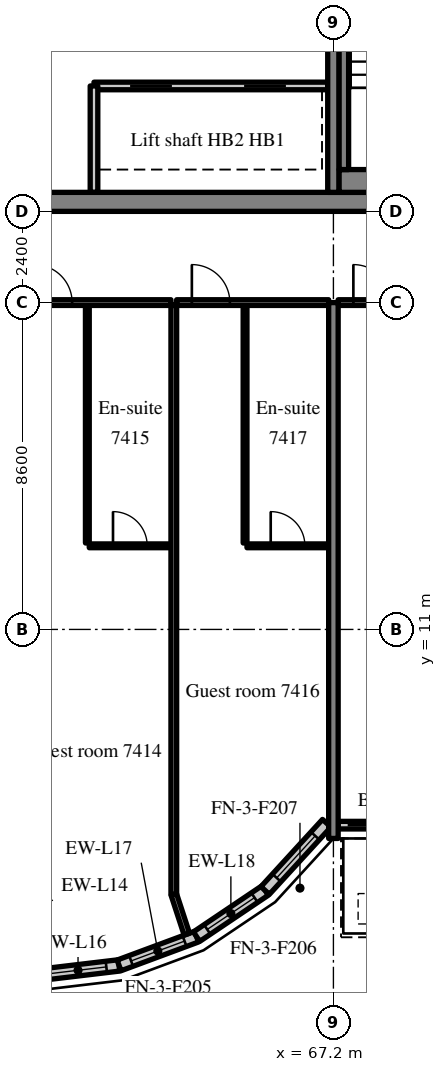
"""IFC4 building model, lengths in metres.
Left out: names, types, materials, properties, quantities, classifications, styles, units other than length and angle.
Written with IfcOpenShell. Run it as: python <this file> out.ifc"""

import sys

from ifc_helpers import new_model, si_unit, direction, frame, frame_2d, origin, place, context, subcontext, project, spatial, rectangle, extrude, source, transform, mapped, element, fill, save


model = new_model("IFC4")
c1 = context("Model", 3, precision=1e-05, world=origin(), true_north=direction((0.0, 1.0)))
c2 = subcontext(c1, "Body", "Model", "MODEL_VIEW")
j1 = project(units=[si_unit("LENGTHUNIT", "METRE"), si_unit("PLANEANGLEUNIT", "RADIAN")], contexts=[c1])
p1 = place(None, origin())
s1 = spatial("IfcSite", under=j1, at=p1, CompositionType="ELEMENT")
p2 = place(p1, origin())
s2 = spatial("IfcBuilding", under=s1, at=p2, CompositionType="ELEMENT")
p3 = place(p2, frame((0.0, 0.0, 309.7)))
s3 = spatial("IfcBuildingStorey", under=s2, at=p3, CompositionType="ELEMENT", Elevation=309.7)
m1 = source(origin(), c2, "Body", "SweptSolid", [
    extrude(rectangle(XDim=50.4, YDim=0.5, at=frame_2d((25.2, 0.0))), origin(), (0.0, 0.0, 1.0), 3.72),
])
p4 = place(p3, frame((25.2, 22.25, 0.0), z_axis=(0.0, 0.0, 1.0), x_axis=(1.0, 0.0, 0.0)))
e1 = element("IfcWall", 1, at=p4, inside=s3, PredefinedType="SHEAR", context=c2, shape_type="MappedRepresentation", body=[
    mapped(m1, transform((0.0, 0.0, 0.0), scale=1.0)),
])
m2 = source(origin(), c2, "Body", "SweptSolid", [
    extrude(rectangle(XDim=1.8, YDim=2.1, at=frame_2d((0.9, 1.05))), frame((0.0, 0.26, 0.0), z_axis=(0.0, -1.0, 0.0), x_axis=(1.0, 0.0, 0.0)), (0.0, 0.0, 1.0), 0.52),
])
p5 = place(p4, frame((15.9, 0.0, 0.0)))
e2 = element("IfcOpeningElement", 2, at=p5, cuts=e1, PredefinedType="OPENING", context=c2, shape_type="MappedRepresentation", body=[
    mapped(m2, transform((0.0, 0.0, 0.0), scale=1.0)),
])
m3 = source(origin(), c2, "Body", "SweptSolid", [
    extrude(rectangle(XDim=0.9, YDim=2.1, at=frame_2d((0.45, 1.05))), frame((0.0, 0.26, 0.0), z_axis=(0.0, -1.0, 0.0), x_axis=(1.0, 0.0, 0.0)), (0.0, 0.0, 1.0), 0.52),
])
p6 = place(p4, frame((11.175, 0.0, 0.0)))
e3 = element("IfcOpeningElement", 3, at=p6, cuts=e1, PredefinedType="OPENING", context=c2, shape_type="MappedRepresentation", body=[
    mapped(m3, transform((0.0, 0.0, 0.0), scale=1.0)),
])
p7 = place(p4, frame((21.525, 0.0, 0.0)))
e4 = element("IfcOpeningElement", 4, at=p7, cuts=e1, PredefinedType="OPENING", context=c2, shape_type="MappedRepresentation", body=[
    mapped(m3, transform((0.0, 0.0, 0.0), scale=1.0)),
])
p8 = place(p4, frame((32.7, 0.0, 0.0)))
e5 = element("IfcOpeningElement", 5, at=p8, cuts=e1, PredefinedType="OPENING", context=c2, shape_type="MappedRepresentation", body=[
    mapped(m2, transform((0.0, 0.0, 0.0), scale=1.0)),
])
m4 = source(origin(), c2, "Body", "SweptSolid", [
    extrude(rectangle(XDim=1.2, YDim=2.1, at=frame_2d((0.6, 1.05))), frame((0.0, 0.26, 0.0), z_axis=(0.0, -1.0, 0.0), x_axis=(1.0, 0.0, 0.0)), (0.0, 0.0, 1.0), 0.52),
])
p9 = place(p4, frame((6.5, 0.0, 0.0)))
e6 = element("IfcOpeningElement", 6, at=p9, cuts=e1, PredefinedType="OPENING", context=c2, shape_type="MappedRepresentation", body=[
    mapped(m4, transform((0.0, 0.0, 0.0), scale=1.0)),
])
p10 = place(p4, frame((47.975, 0.0, 0.0)))
e7 = element("IfcOpeningElement", 7, at=p10, cuts=e1, PredefinedType="OPENING", context=c2, shape_type="MappedRepresentation", body=[
    mapped(m4, transform((0.0, 0.0, 0.0), scale=1.0)),
])
m5 = source(origin(), c2, "Body", "SweptSolid", [
    extrude(rectangle(XDim=19.0, YDim=0.3, at=frame_2d((9.5, 0.0))), origin(), (0.0, 0.0, 1.0), 3.72),
])
p11 = place(p3, frame((67.2, 22.5, 0.0), z_axis=(0.0, 0.0, 1.0), x_axis=(0.0, 1.0, 0.0)))
e8 = element("IfcWall", 8, at=p11, inside=s3, PredefinedType="SHEAR", context=c2, shape_type="MappedRepresentation", body=[
    mapped(m5, transform((0.0, 0.0, 0.0), scale=1.0)),
])
m6 = source(origin(), c2, "Body", "SweptSolid", [
    extrude(rectangle(XDim=14.1, YDim=0.25, at=frame_2d((7.05, 0.0))), origin(), (0.0, 0.0, 1.0), 3.72),
])
p12 = place(p3, frame((67.2, 5.5, 0.0), z_axis=(0.0, 0.0, 1.0), x_axis=(0.0, 1.0, 0.0)))
e9 = element("IfcWall", 9, at=p12, inside=s3, PredefinedType="SHEAR", context=c2, shape_type="MappedRepresentation", body=[
    mapped(m6, transform((0.0, 0.0, 0.0), scale=1.0)),
])
m7 = source(origin(), c2, "Body", "SweptSolid", [
    extrude(rectangle(XDim=2.175, YDim=0.3, at=frame_2d((1.087, 0.0))), origin(), (0.0, 0.0, 1.0), 3.72),
])
p13 = place(p3, frame((59.4, 1.903, 0.0), z_axis=(0.0, 0.0, 1.0), x_axis=(0.993002698611, 0.118091661648, 0.0)))
e10 = element("IfcWall", 10, at=p13, inside=s3, PredefinedType="SOLIDWALL", context=c2, shape_type="MappedRepresentation", body=[
    mapped(m7, transform((0.0, 0.0, 0.0), scale=1.0)),
])
m8 = source(origin(), c2, "Body", "SweptSolid", [
    extrude(rectangle(XDim=1.5, YDim=2.0, at=frame_2d((0.75, 1.0))), frame((0.0, 0.16, 0.0), z_axis=(0.0, -1.0, 0.0), x_axis=(1.0, 0.0, 0.0)), (0.0, 0.0, 1.0), 0.32),
])
p14 = place(p13, frame((0.337, 0.0, 0.9)))
e11 = element("IfcOpeningElement", 11, at=p14, cuts=e10, PredefinedType="OPENING", context=c2, shape_type="MappedRepresentation", body=[
    mapped(m8, transform((0.0, 0.0, 0.0), scale=1.0)),
])
m9 = source(origin(), c2, "Body", "SweptSolid", [
    extrude(rectangle(XDim=2.176, YDim=0.3, at=frame_2d((1.088, 0.0))), origin(), (0.0, 0.0, 1.0), 3.72),
])
p15 = place(p3, frame((61.56, 2.16, 0.0), z_axis=(0.0, 0.0, 1.0), x_axis=(0.937531979054, 0.347899106424, 0.0)))
e12 = element("IfcWall", 12, at=p15, inside=s3, PredefinedType="SOLIDWALL", context=c2, shape_type="MappedRepresentation", body=[
    mapped(m9, transform((0.0, 0.0, 0.0), scale=1.0)),
])
p16 = place(p15, frame((0.338, 0.0, 0.9)))
e13 = element("IfcOpeningElement", 13, at=p16, cuts=e12, PredefinedType="OPENING", context=c2, shape_type="MappedRepresentation", body=[
    mapped(m8, transform((0.0, 0.0, 0.0), scale=1.0)),
])
m10 = source(origin(), c2, "Body", "SweptSolid", [
    extrude(rectangle(XDim=2.176, YDim=0.3, at=frame_2d((1.088, 0.0))), origin(), (0.0, 0.0, 1.0), 3.72),
])
p17 = place(p3, frame((63.599, 2.917, 0.0), z_axis=(0.0, 0.0, 1.0), x_axis=(0.829625727223, 0.558319937607, 0.0)))
e14 = element("IfcWall", 14, at=p17, inside=s3, PredefinedType="SOLIDWALL", context=c2, shape_type="MappedRepresentation", body=[
    mapped(m10, transform((0.0, 0.0, 0.0), scale=1.0)),
])
p18 = place(p17, frame((0.338, 0.0, 0.9)))
e15 = element("IfcOpeningElement", 15, at=p18, cuts=e14, PredefinedType="OPENING", context=c2, shape_type="MappedRepresentation", body=[
    mapped(m8, transform((0.0, 0.0, 0.0), scale=1.0)),
])
m11 = source(origin(), c2, "Body", "SweptSolid", [
    extrude(rectangle(XDim=2.398, YDim=0.3, at=frame_2d((1.199, 0.0))), origin(), (0.0, 0.0, 1.0), 3.72),
])
p19 = place(p3, frame((65.404, 4.131, 0.0), z_axis=(0.0, 0.0, 1.0), x_axis=(0.675374189419, 0.737475222815, 0.0)))
e16 = element("IfcWall", 16, at=p19, inside=s3, PredefinedType="SOLIDWALL", context=c2, shape_type="MappedRepresentation", body=[
    mapped(m11, transform((0.0, 0.0, 0.0), scale=1.0)),
])
p20 = place(p19, frame((0.449, 0.0, 0.9)))
e17 = element("IfcOpeningElement", 17, at=p20, cuts=e16, PredefinedType="OPENING", context=c2, shape_type="MappedRepresentation", body=[
    mapped(m8, transform((0.0, 0.0, 0.0), scale=1.0)),
])
m12 = source(origin(), c2, "Body", "SweptSolid", [
    extrude(rectangle(XDim=8.15, YDim=0.2, at=frame_2d((4.075, 0.0))), origin(), (0.0, 0.0, 1.0), 3.17),
])
p21 = place(p3, frame((67.325, 5.85, 0.0), z_axis=(0.0, 0.0, 1.0), x_axis=(1.0, 0.0, 0.0)))
e18 = element("IfcWall", 18, at=p21, inside=s3, PredefinedType="SOLIDWALL", context=c2, shape_type="MappedRepresentation", body=[
    mapped(m12, transform((0.0, 0.0, 0.0), scale=1.0)),
])
m13 = source(origin(), c2, "Body", "SweptSolid", [
    extrude(rectangle(XDim=1.2, YDim=2.4, at=frame_2d((0.6, 1.2))), frame((0.0, 0.11, 0.0), z_axis=(0.0, -1.0, 0.0), x_axis=(1.0, 0.0, 0.0)), (0.0, 0.0, 1.0), 0.22),
])
p22 = place(p21, frame((0.25, 0.0, 0.0)))
e19 = element("IfcOpeningElement", 19, at=p22, cuts=e18, PredefinedType="OPENING", context=c2, shape_type="MappedRepresentation", body=[
    mapped(m13, transform((0.0, 0.0, 0.0), scale=1.0)),
])
m14 = source(origin(), c2, "Body", "SweptSolid", [
    extrude(rectangle(XDim=1.5, YDim=1.5, at=frame_2d((0.75, 0.75))), frame((0.0, 0.11, 0.0), z_axis=(0.0, -1.0, 0.0), x_axis=(1.0, 0.0, 0.0)), (0.0, 0.0, 1.0), 0.22),
])
p23 = place(p21, frame((2.325, 0.0, 0.9)))
e20 = element("IfcOpeningElement", 20, at=p23, cuts=e18, PredefinedType="OPENING", context=c2, shape_type="MappedRepresentation", body=[
    mapped(m14, transform((0.0, 0.0, 0.0), scale=1.0)),
])
p24 = place(p21, frame((4.325, 0.0, 0.0)))
e21 = element("IfcOpeningElement", 21, at=p24, cuts=e18, PredefinedType="OPENING", context=c2, shape_type="MappedRepresentation", body=[
    mapped(m13, transform((0.0, 0.0, 0.0), scale=1.0)),
])
p25 = place(p21, frame((6.4, 0.0, 0.9)))
e22 = element("IfcOpeningElement", 22, at=p25, cuts=e18, PredefinedType="OPENING", context=c2, shape_type="MappedRepresentation", body=[
    mapped(m14, transform((0.0, 0.0, 0.0), scale=1.0)),
])
m15 = source(origin(), c2, "Body", "SweptSolid", [
    extrude(rectangle(XDim=6.15, YDim=0.2, at=frame_2d((3.075, 0.0))), origin(), (0.0, 0.0, 1.0), 3.72),
])
p26 = place(p3, frame((67.05, 25.3, 0.0), z_axis=(0.0, 0.0, 1.0), x_axis=(-1.0, 0.0, 0.0)))
e23 = element("IfcWall", 23, at=p26, inside=s3, PredefinedType="SOLIDWALL", context=c2, shape_type="MappedRepresentation", body=[
    mapped(m15, transform((0.0, 0.0, 0.0), scale=1.0)),
])
m16 = source(origin(), c2, "Body", "SweptSolid", [
    extrude(rectangle(XDim=1.1, YDim=2.1, at=frame_2d((0.55, 1.05))), frame((0.0, 0.11, 0.0), z_axis=(0.0, -1.0, 0.0), x_axis=(1.0, 0.0, 0.0)), (0.0, 0.0, 1.0), 0.22),
])
p27 = place(p26, frame((1.1, 0.0, 0.0)))
e24 = element("IfcOpeningElement", 24, at=p27, cuts=e23, PredefinedType="OPENING", context=c2, shape_type="MappedRepresentation", body=[
    mapped(m16, transform((0.0, 0.0, 0.0), scale=1.0)),
])
p28 = place(p26, frame((4.1, 0.0, 0.0)))
e25 = element("IfcOpeningElement", 25, at=p28, cuts=e23, PredefinedType="OPENING", context=c2, shape_type="MappedRepresentation", body=[
    mapped(m16, transform((0.0, 0.0, 0.0), scale=1.0)),
])
m17 = source(origin(), c2, "Body", "SweptSolid", [
    extrude(rectangle(XDim=2.8, YDim=0.2, at=frame_2d((1.4, 0.0))), origin(), (0.0, 0.0, 1.0), 3.72),
])
p29 = place(p3, frame((60.9, 22.5, 0.0), z_axis=(0.0, 0.0, 1.0), x_axis=(0.0, 1.0, 0.0)))
e26 = element("IfcWall", 26, at=p29, inside=s3, PredefinedType="SOLIDWALL", context=c2, shape_type="MappedRepresentation", body=[
    mapped(m17, transform((0.0, 0.0, 0.0), scale=1.0)),
])
m18 = source(origin(), c2, "Body", "SweptSolid", [
    extrude(rectangle(XDim=4.9, YDim=0.6, at=frame_2d((2.45, 0.0))), origin(), (0.0, 0.0, 1.0), 3.72),
])
p30 = place(p3, frame((67.35, 22.8, 0.0), z_axis=(0.0, 0.0, 1.0), x_axis=(1.0, 0.0, 0.0)))
e27 = element("IfcWall", 27, at=p30, inside=s3, PredefinedType="SOLIDWALL", context=c2, shape_type="MappedRepresentation", body=[
    mapped(m18, transform((0.0, 0.0, 0.0), scale=1.0)),
])
m19 = source(origin(), c2, "Body", "SweptSolid", [
    extrude(rectangle(XDim=8.1, YDim=0.25, at=frame_2d((4.05, 0.0))), origin(), (0.0, 0.0, 1.0), 3.72),
])
p31 = place(p3, frame((67.475, 23.1, 0.0), z_axis=(0.0, 0.0, 1.0), x_axis=(0.0, 1.0, 0.0)))
e28 = element("IfcWall", 28, at=p31, inside=s3, PredefinedType="SOLIDWALL", context=c2, shape_type="MappedRepresentation", body=[
    mapped(m19, transform((0.0, 0.0, 0.0), scale=1.0)),
])
m20 = source(origin(), c2, "Body", "SweptSolid", [
    extrude(rectangle(XDim=6.25, YDim=0.1, at=frame_2d((3.125, 0.0))), origin(), (0.0, 0.0, 1.0), 3.72),
])
p32 = place(p3, frame((60.725, 13.275, 0.0), z_axis=(0.0, 0.0, 1.0), x_axis=(0.0, 1.0, 0.0)))
e29 = element("IfcWall", 29, at=p32, inside=s3, PredefinedType="PARTITIONING", context=c2, shape_type="MappedRepresentation", body=[
    mapped(m20, transform((0.0, 0.0, 0.0), scale=1.0)),
])
m21 = source(origin(), c2, "Body", "SweptSolid", [
    extrude(rectangle(XDim=2.15, YDim=0.1, at=frame_2d((1.075, 0.0))), origin(), (0.0, 0.0, 1.0), 3.72),
])
p33 = place(p3, frame((60.775, 13.2, 0.0), z_axis=(0.0, 0.0, 1.0), x_axis=(1.0, 0.0, 0.0)))
e30 = element("IfcWall", 30, at=p33, inside=s3, PredefinedType="PARTITIONING", context=c2, shape_type="MappedRepresentation", body=[
    mapped(m21, transform((0.0, 0.0, 0.0), scale=1.0)),
])
m22 = source(origin(), c2, "Body", "SweptSolid", [
    extrude(rectangle(XDim=0.9, YDim=2.1, at=frame_2d((0.45, 1.05))), frame((0.0, 0.06, 0.0), z_axis=(0.0, -1.0, 0.0), x_axis=(1.0, 0.0, 0.0)), (0.0, 0.0, 1.0), 0.12),
])
p34 = place(p33, frame((0.625, 0.0, 0.0)))
e31 = element("IfcOpeningElement", 31, at=p34, cuts=e30, PredefinedType="OPENING", context=c2, shape_type="MappedRepresentation", body=[
    mapped(m22, transform((0.0, 0.0, 0.0), scale=1.0)),
])
m23 = source(origin(), c2, "Body", "SweptSolid", [
    extrude(rectangle(XDim=4.0, YDim=0.15, at=frame_2d((2.0, 0.0))), origin(), (0.0, 0.0, 1.0), 3.02),
])
p35 = place(p3, frame((58.925, 19.6, 0.0), z_axis=(0.0, 0.0, 1.0), x_axis=(1.0, 0.0, 0.0)))
e32 = element("IfcWall", 32, at=p35, inside=s3, PredefinedType="PARTITIONING", context=c2, shape_type="MappedRepresentation", body=[
    mapped(m23, transform((0.0, 0.0, 0.0), scale=1.0)),
])
m24 = source(origin(), c2, "Body", "SweptSolid", [
    extrude(rectangle(XDim=1.0, YDim=2.1, at=frame_2d((0.5, 1.05))), frame((0.0, 0.085, 0.0), z_axis=(0.0, -1.0, 0.0), x_axis=(1.0, 0.0, 0.0)), (0.0, 0.0, 1.0), 0.17),
])
p36 = place(p35, frame((0.4, 0.0, 0.0)))
e33 = element("IfcOpeningElement", 33, at=p36, cuts=e32, PredefinedType="OPENING", context=c2, shape_type="MappedRepresentation", body=[
    mapped(m24, transform((0.0, 0.0, 0.0), scale=1.0)),
])
p37 = place(p3, frame((64.875, 13.275, 0.0), z_axis=(0.0, 0.0, 1.0), x_axis=(0.0, 1.0, 0.0)))
e34 = element("IfcWall", 34, at=p37, inside=s3, PredefinedType="PARTITIONING", context=c2, shape_type="MappedRepresentation", body=[
    mapped(m20, transform((0.0, 0.0, 0.0), scale=1.0)),
])
m25 = source(origin(), c2, "Body", "SweptSolid", [
    extrude(rectangle(XDim=2.15, YDim=0.1, at=frame_2d((1.075, 0.0))), origin(), (0.0, 0.0, 1.0), 3.72),
])
p38 = place(p3, frame((64.925, 13.2, 0.0), z_axis=(0.0, 0.0, 1.0), x_axis=(1.0, 0.0, 0.0)))
e35 = element("IfcWall", 35, at=p38, inside=s3, PredefinedType="PARTITIONING", context=c2, shape_type="MappedRepresentation", body=[
    mapped(m25, transform((0.0, 0.0, 0.0), scale=1.0)),
])
p39 = place(p38, frame((0.625, 0.0, 0.0)))
e36 = element("IfcOpeningElement", 36, at=p39, cuts=e35, PredefinedType="OPENING", context=c2, shape_type="MappedRepresentation", body=[
    mapped(m22, transform((0.0, 0.0, 0.0), scale=1.0)),
])
p40 = place(p3, frame((63.075, 19.6, 0.0), z_axis=(0.0, 0.0, 1.0), x_axis=(1.0, 0.0, 0.0)))
e37 = element("IfcWall", 37, at=p40, inside=s3, PredefinedType="PARTITIONING", context=c2, shape_type="MappedRepresentation", body=[
    mapped(m23, transform((0.0, 0.0, 0.0), scale=1.0)),
])
p41 = place(p40, frame((0.4, 0.0, 0.0)))
e38 = element("IfcOpeningElement", 38, at=p41, cuts=e37, PredefinedType="OPENING", context=c2, shape_type="MappedRepresentation", body=[
    mapped(m24, transform((0.0, 0.0, 0.0), scale=1.0)),
])
m26 = source(origin(), c2, "Body", "SweptSolid", [
    extrude(rectangle(XDim=15.498, YDim=0.15, at=frame_2d((7.749, 0.0))), origin(), (0.0, 0.0, 1.0), 3.72),
])
p42 = place(p3, frame((63.0, 4.027, 0.0), z_axis=(0.0, 0.0, 1.0), x_axis=(0.0, 1.0, 0.0)))
e39 = element("IfcWall", 39, at=p42, inside=s3, PredefinedType="PARTITIONING", context=c2, shape_type="MappedRepresentation", body=[
    mapped(m26, transform((0.0, 0.0, 0.0), scale=1.0)),
])
m27 = source(origin(), c2, "Body", "SweptSolid", [
    extrude(rectangle(XDim=8.15, YDim=0.15, at=frame_2d((4.075, 0.0))), origin(), (0.0, 0.0, 1.0), 3.02),
])
p43 = place(p3, frame((67.325, 19.6, 0.0), z_axis=(0.0, 0.0, 1.0), x_axis=(1.0, 0.0, 0.0)))
e40 = element("IfcWall", 40, at=p43, inside=s3, PredefinedType="PARTITIONING", context=c2, shape_type="MappedRepresentation", body=[
    mapped(m27, transform((0.0, 0.0, 0.0), scale=1.0)),
])
p44 = place(p43, frame((0.4, 0.0, 0.0)))
e41 = element("IfcOpeningElement", 41, at=p44, cuts=e40, PredefinedType="OPENING", context=c2, shape_type="MappedRepresentation", body=[
    mapped(m24, transform((0.0, 0.0, 0.0), scale=1.0)),
])
m28 = source(origin(), c2, "Body", "SweptSolid", [
    extrude(rectangle(XDim=1.101, YDim=0.15, at=frame_2d((0.55, 0.0))), origin(), (0.0, 0.0, 1.0), 3.72),
])
p45 = place(p3, frame((63.343, 2.981, 0.0), z_axis=(0.0, 0.0, 1.0), x_axis=(-0.311567081539, 0.950224159712, 0.0)))
e42 = element("IfcWall", 42, at=p45, inside=s3, PredefinedType="PARTITIONING", context=c2, shape_type="MappedRepresentation", body=[
    mapped(m28, transform((0.0, 0.0, 0.0), scale=1.0)),
])
m29 = source(origin(), c2, "Body", "SweptSolid", [
    extrude(rectangle(XDim=1.5, YDim=2.0, at=frame_2d((0.75, 1.0))), frame((0.0, 0.03, 0.0), z_axis=(0.0, -1.0, 0.0), x_axis=(1.0, 0.0, 0.0)), (0.0, 0.0, 1.0), 0.06),
])
p46 = place(p14, origin())
e43 = element("IfcWindow", 43, at=p46, inside=s3, PartitioningType="SINGLE_PANEL", PredefinedType="WINDOW", context=c2, shape_type="MappedRepresentation", body=[
    mapped(m29, transform((0.0, 0.0, 0.0), scale=1.0)),
])
fill(e11, e43)
p47 = place(p16, origin())
e44 = element("IfcWindow", 44, at=p47, inside=s3, PartitioningType="SINGLE_PANEL", PredefinedType="WINDOW", context=c2, shape_type="MappedRepresentation", body=[
    mapped(m29, transform((0.0, 0.0, 0.0), scale=1.0)),
])
fill(e13, e44)
p48 = place(p18, origin())
e45 = element("IfcWindow", 45, at=p48, inside=s3, PartitioningType="SINGLE_PANEL", PredefinedType="WINDOW", context=c2, shape_type="MappedRepresentation", body=[
    mapped(m29, transform((0.0, 0.0, 0.0), scale=1.0)),
])
fill(e15, e45)
p49 = place(p20, origin())
e46 = element("IfcWindow", 46, at=p49, inside=s3, PartitioningType="SINGLE_PANEL", PredefinedType="WINDOW", context=c2, shape_type="MappedRepresentation", body=[
    mapped(m29, transform((0.0, 0.0, 0.0), scale=1.0)),
])
fill(e17, e46)
m30 = source(origin(), c2, "Body", "SweptSolid", [
    extrude(rectangle(XDim=1.2, YDim=2.4, at=frame_2d((0.6, 1.2))), frame((0.0, 0.025, 0.0), z_axis=(0.0, -1.0, 0.0), x_axis=(1.0, 0.0, 0.0)), (0.0, 0.0, 1.0), 0.05),
])
p50 = place(p22, origin())
e47 = element("IfcDoor", 47, at=p50, inside=s3, OperationType="SLIDING_TO_LEFT", PredefinedType="DOOR", context=c2, shape_type="MappedRepresentation", body=[
    mapped(m30, transform((0.0, 0.0, 0.0), scale=1.0)),
])
fill(e19, e47)
m31 = source(origin(), c2, "Body", "SweptSolid", [
    extrude(rectangle(XDim=1.1, YDim=2.1, at=frame_2d((0.55, 1.05))), frame((0.0, 0.025, 0.0), z_axis=(0.0, -1.0, 0.0), x_axis=(1.0, 0.0, 0.0)), (0.0, 0.0, 1.0), 0.05),
])
p51 = place(p27, origin())
e48 = element("IfcDoor", 48, at=p51, inside=s3, OperationType="SLIDING_TO_RIGHT", PredefinedType="DOOR", context=c2, shape_type="MappedRepresentation", body=[
    mapped(m31, transform((0.0, 0.0, 0.0), scale=1.0)),
])
fill(e24, e48)
p52 = place(p28, origin())
e49 = element("IfcDoor", 49, at=p52, inside=s3, OperationType="SLIDING_TO_LEFT", PredefinedType="DOOR", context=c2, shape_type="MappedRepresentation", body=[
    mapped(m31, transform((0.0, 0.0, 0.0), scale=1.0)),
])
fill(e25, e49)
m32 = source(origin(), c2, "Body", "SweptSolid", [
    extrude(rectangle(XDim=0.9, YDim=2.1, at=frame_2d((0.45, 1.05))), frame((0.0, 0.025, 0.0), z_axis=(0.0, -1.0, 0.0), x_axis=(1.0, 0.0, 0.0)), (0.0, 0.0, 1.0), 0.05),
])
p53 = place(p34, origin())
e50 = element("IfcDoor", 50, at=p53, inside=s3, OperationType="SINGLE_SWING_LEFT", PredefinedType="DOOR", context=c2, shape_type="MappedRepresentation", body=[
    mapped(m32, transform((0.0, 0.0, 0.0), scale=1.0)),
])
fill(e31, e50)
m33 = source(origin(), c2, "Body", "SweptSolid", [
    extrude(rectangle(XDim=1.0, YDim=2.1, at=frame_2d((0.5, 1.05))), frame((0.0, 0.025, 0.0), z_axis=(0.0, -1.0, 0.0), x_axis=(1.0, 0.0, 0.0)), (0.0, 0.0, 1.0), 0.05),
])
p54 = place(p36, origin())
e51 = element("IfcDoor", 51, at=p54, inside=s3, OperationType="SINGLE_SWING_LEFT", PredefinedType="DOOR", context=c2, shape_type="MappedRepresentation", body=[
    mapped(m33, transform((0.0, 0.0, 0.0), scale=1.0)),
])
fill(e33, e51)
p55 = place(p39, origin())
e52 = element("IfcDoor", 52, at=p55, inside=s3, OperationType="SINGLE_SWING_LEFT", PredefinedType="DOOR", context=c2, shape_type="MappedRepresentation", body=[
    mapped(m32, transform((0.0, 0.0, 0.0), scale=1.0)),
])
fill(e36, e52)
p56 = place(p41, origin())
e53 = element("IfcDoor", 53, at=p56, inside=s3, OperationType="SINGLE_SWING_LEFT", PredefinedType="DOOR", context=c2, shape_type="MappedRepresentation", body=[
    mapped(m33, transform((0.0, 0.0, 0.0), scale=1.0)),
])
fill(e38, e53)
p57 = place(p44, origin())
e54 = element("IfcDoor", 54, at=p57, inside=s3, OperationType="SINGLE_SWING_LEFT", PredefinedType="DOOR", context=c2, shape_type="MappedRepresentation", body=[
    mapped(m33, transform((0.0, 0.0, 0.0), scale=1.0)),
])
fill(e41, e54)
save(model, sys.argv[1])
